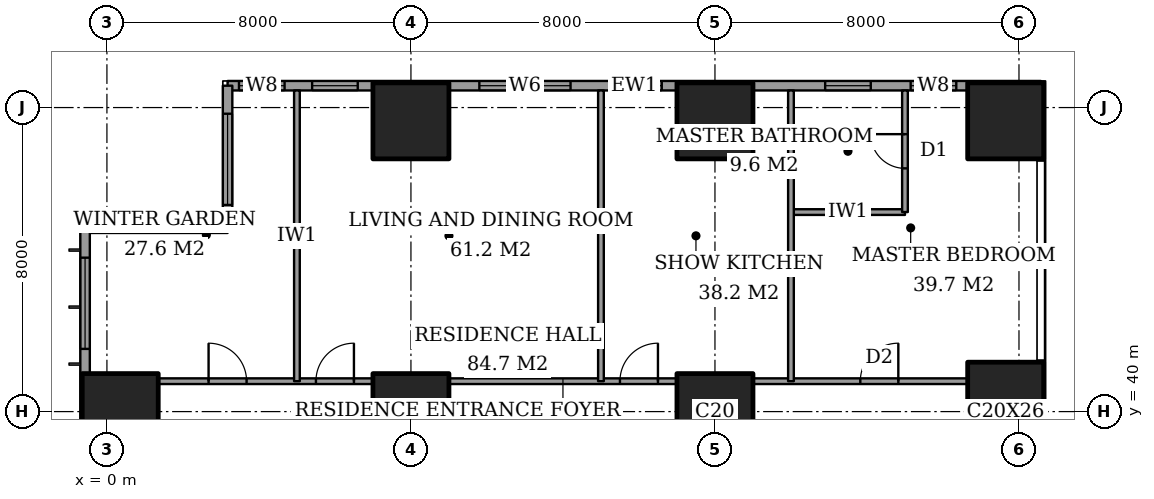
"""IFC4 building model, lengths in metres.
Left out: names, types, materials, properties, quantities, classifications, styles, units other than length and angle.
Written with IfcOpenShell. Run it as: python <this file> out.ifc"""

import sys

from ifc_helpers import new_model, si_unit, direction, frame, frame_2d, origin, origin_2d, place, context, subcontext, project, spatial, rectangle, extrude, element, fill, save


model = new_model("IFC4")
c1 = context("Model", 3, precision=1e-05, world=origin(), true_north=direction((0.0, 1.0)))
c2 = subcontext(c1, "Body", "Model", "MODEL_VIEW")
j1 = project(units=[si_unit("LENGTHUNIT", "METRE"), si_unit("PLANEANGLEUNIT", "RADIAN")], contexts=[c1])
p1 = place(None, origin())
s1 = spatial("IfcSite", under=j1, at=p1, CompositionType="ELEMENT")
p2 = place(p1, origin())
s2 = spatial("IfcBuilding", under=s1, at=p2, CompositionType="ELEMENT")
p3 = place(p2, frame((0.0, 0.0, 54.8)))
s3 = spatial("IfcBuildingStorey", under=s2, at=p3, CompositionType="ELEMENT", Elevation=54.8)
for number, where, z_axis, x_axis in (
    (1, (0.35, 40.0, 0.0), (0.0, 0.0, 1.0), (1.0, 0.0, 0.0)),
    (2, (8.0, 40.0, 0.0), (0.0, 0.0, 1.0), (1.0, 0.0, 0.0)),
    (3, (8.0, 47.65, 0.0), (0.0, 0.0, 1.0), (1.0, 0.0, 0.0)),
    (4, (16.0, 40.0, 0.0), (0.0, 0.0, 1.0), (1.0, 0.0, 0.0)),
    (5, (16.0, 47.65, 0.0), (0.0, 0.0, 1.0), (1.0, 0.0, 0.0)),
):
    element("IfcColumn", number, at=place(p3, frame(where, z_axis=z_axis, x_axis=x_axis)), inside=s3, PredefinedType="COLUMN", context=c2, shape_type="SweptSolid", body=[
        extrude(rectangle(XDim=2.0, YDim=2.0, at=origin_2d()), origin(), (0.0, 0.0, 1.0), 3.6),
    ])
p4 = place(p3, frame((23.65, 40.0, 0.0), z_axis=(0.0, 0.0, 1.0), x_axis=(1.0, 0.0, 0.0)))
e6 = element("IfcColumn", 6, at=p4, inside=s3, PredefinedType="COLUMN", context=c2, shape_type="SweptSolid", body=[
    extrude(rectangle(XDim=2.0, YDim=2.6, at=origin_2d()), origin(), (0.0, 0.0, 1.0), 3.6),
])
p5 = place(p3, frame((23.65, 47.65, 0.0), z_axis=(0.0, 0.0, 1.0), x_axis=(1.0, 0.0, 0.0)))
e7 = element("IfcColumn", 7, at=p5, inside=s3, PredefinedType="COLUMN", context=c2, shape_type="SweptSolid", body=[
    extrude(rectangle(XDim=2.0, YDim=2.0, at=origin_2d()), origin(), (0.0, 0.0, 1.0), 3.6),
])
p6 = place(p3, frame((24.575, 48.575, 0.0), z_axis=(0.0, 0.0, 1.0), x_axis=(-1.0, 0.0, 0.0)))
e8 = element("IfcWall", 8, at=p6, inside=s3, PredefinedType="SOLIDWALL", context=c2, shape_type="SweptSolid", body=[
    extrude(rectangle(XDim=21.4, YDim=0.25, at=frame_2d((10.7, 0.0))), origin(), (0.0, 0.0, 1.0), 3.6),
])
p7 = place(p6, frame((2.225, 0.0, 0.6)))
e9 = element("IfcOpeningElement", 9, at=p7, cuts=e8, PredefinedType="OPENING", context=c2, shape_type="SweptSolid", body=[
    extrude(rectangle(XDim=1.2, YDim=2.0, at=frame_2d((0.6, 1.0))), frame((0.0, 0.135, 0.0), z_axis=(0.0, -1.0, 0.0), x_axis=(1.0, 0.0, 0.0)), (0.0, 0.0, 1.0), 0.27),
])
p8 = place(p6, frame((4.475, 0.0, 0.6)))
e10 = element("IfcOpeningElement", 10, at=p8, cuts=e8, PredefinedType="OPENING", context=c2, shape_type="SweptSolid", body=[
    extrude(rectangle(XDim=1.2, YDim=2.0, at=frame_2d((0.6, 1.0))), frame((0.0, 0.135, 0.0), z_axis=(0.0, -1.0, 0.0), x_axis=(1.0, 0.0, 0.0)), (0.0, 0.0, 1.0), 0.27),
])
p9 = place(p6, frame((9.975, 0.0, 0.6)))
e11 = element("IfcOpeningElement", 11, at=p9, cuts=e8, PredefinedType="OPENING", context=c2, shape_type="SweptSolid", body=[
    extrude(rectangle(XDim=1.2, YDim=2.0, at=frame_2d((0.6, 1.0))), frame((0.0, 0.135, 0.0), z_axis=(0.0, -1.0, 0.0), x_axis=(1.0, 0.0, 0.0)), (0.0, 0.0, 1.0), 0.27),
])
p10 = place(p6, frame((12.375, 0.0, 0.6)))
e12 = element("IfcOpeningElement", 12, at=p10, cuts=e8, PredefinedType="OPENING", context=c2, shape_type="SweptSolid", body=[
    extrude(rectangle(XDim=2.4, YDim=2.0, at=frame_2d((1.2, 1.0))), frame((0.0, 0.135, 0.0), z_axis=(0.0, -1.0, 0.0), x_axis=(1.0, 0.0, 0.0)), (0.0, 0.0, 1.0), 0.27),
])
p11 = place(p6, frame((17.975, 0.0, 0.6)))
e13 = element("IfcOpeningElement", 13, at=p11, cuts=e8, PredefinedType="OPENING", context=c2, shape_type="SweptSolid", body=[
    extrude(rectangle(XDim=1.2, YDim=2.0, at=frame_2d((0.6, 1.0))), frame((0.0, 0.135, 0.0), z_axis=(0.0, -1.0, 0.0), x_axis=(1.0, 0.0, 0.0)), (0.0, 0.0, 1.0), 0.27),
])
p12 = place(p6, frame((19.9, 0.0, 0.6)))
e14 = element("IfcOpeningElement", 14, at=p12, cuts=e8, PredefinedType="OPENING", context=c2, shape_type="SweptSolid", body=[
    extrude(rectangle(XDim=1.2, YDim=2.0, at=frame_2d((0.6, 1.0))), frame((0.0, 0.135, 0.0), z_axis=(0.0, -1.0, 0.0), x_axis=(1.0, 0.0, 0.0)), (0.0, 0.0, 1.0), 0.27),
])
p13 = place(p3, frame((3.175, 48.575, 0.0), z_axis=(0.0, 0.0, 1.0), x_axis=(0.0, -1.0, 0.0)))
e15 = element("IfcWall", 15, at=p13, inside=s3, PredefinedType="SOLIDWALL", context=c2, shape_type="SweptSolid", body=[
    extrude(rectangle(XDim=3.75, YDim=0.25, at=frame_2d((1.875, 0.0))), origin(), (0.0, 0.0, 1.0), 3.6),
])
p14 = place(p13, frame((0.738, 0.0, 0.6)))
e16 = element("IfcOpeningElement", 16, at=p14, cuts=e15, PredefinedType="OPENING", context=c2, shape_type="SweptSolid", body=[
    extrude(rectangle(XDim=2.4, YDim=2.0, at=frame_2d((1.2, 1.0))), frame((0.0, 0.135, 0.0), z_axis=(0.0, -1.0, 0.0), x_axis=(1.0, 0.0, 0.0)), (0.0, 0.0, 1.0), 0.27),
])
p15 = place(p3, frame((3.175, 44.825, 0.0), z_axis=(0.0, 0.0, 1.0), x_axis=(-1.0, 0.0, 0.0)))
e17 = element("IfcWall", 17, at=p15, inside=s3, PredefinedType="SOLIDWALL", context=c2, shape_type="SweptSolid", body=[
    extrude(rectangle(XDim=3.75, YDim=0.25, at=frame_2d((1.875, 0.0))), origin(), (0.0, 0.0, 1.0), 3.6),
])
p16 = place(p15, frame((0.613, 0.0, 0.6)))
e18 = element("IfcOpeningElement", 18, at=p16, cuts=e17, PredefinedType="OPENING", context=c2, shape_type="SweptSolid", body=[
    extrude(rectangle(XDim=2.4, YDim=2.0, at=frame_2d((1.2, 1.0))), frame((0.0, 0.135, 0.0), z_axis=(0.0, -1.0, 0.0), x_axis=(1.0, 0.0, 0.0)), (0.0, 0.0, 1.0), 0.27),
])
p17 = place(p3, frame((-0.575, 44.825, 0.0), z_axis=(0.0, 0.0, 1.0), x_axis=(0.0, -1.0, 0.0)))
e19 = element("IfcWall", 19, at=p17, inside=s3, PredefinedType="SOLIDWALL", context=c2, shape_type="SweptSolid", body=[
    extrude(rectangle(XDim=41.65, YDim=0.25, at=frame_2d((20.825, 0.0))), origin(), (0.0, 0.0, 1.0), 3.6),
])
p18 = place(p17, frame((0.775, 0.0, 0.6)))
e20 = element("IfcOpeningElement", 20, at=p18, cuts=e19, PredefinedType="OPENING", context=c2, shape_type="SweptSolid", body=[
    extrude(rectangle(XDim=2.4, YDim=2.0, at=frame_2d((1.2, 1.0))), frame((0.0, 0.135, 0.0), z_axis=(0.0, -1.0, 0.0), x_axis=(1.0, 0.0, 0.0)), (0.0, 0.0, 1.0), 0.27),
])
p19 = place(p17, frame((6.1, 0.0, 0.6)))
e21 = element("IfcOpeningElement", 21, at=p19, cuts=e19, PredefinedType="OPENING", context=c2, shape_type="SweptSolid", body=[
    extrude(rectangle(XDim=1.2, YDim=2.0, at=frame_2d((0.6, 1.0))), frame((0.0, 0.135, 0.0), z_axis=(0.0, -1.0, 0.0), x_axis=(1.0, 0.0, 0.0)), (0.0, 0.0, 1.0), 0.27),
])
p20 = place(p17, frame((8.425, 0.0, 0.6)))
e22 = element("IfcOpeningElement", 22, at=p20, cuts=e19, PredefinedType="OPENING", context=c2, shape_type="SweptSolid", body=[
    extrude(rectangle(XDim=2.4, YDim=2.0, at=frame_2d((1.2, 1.0))), frame((0.0, 0.135, 0.0), z_axis=(0.0, -1.0, 0.0), x_axis=(1.0, 0.0, 0.0)), (0.0, 0.0, 1.0), 0.27),
])
p21 = place(p17, frame((15.625, 0.0, 0.6)))
e23 = element("IfcOpeningElement", 23, at=p21, cuts=e19, PredefinedType="OPENING", context=c2, shape_type="SweptSolid", body=[
    extrude(rectangle(XDim=2.4, YDim=2.0, at=frame_2d((1.2, 1.0))), frame((0.0, 0.135, 0.0), z_axis=(0.0, -1.0, 0.0), x_axis=(1.0, 0.0, 0.0)), (0.0, 0.0, 1.0), 0.27),
])
p22 = place(p17, frame((23.625, 0.0, 0.6)))
e24 = element("IfcOpeningElement", 24, at=p22, cuts=e19, PredefinedType="OPENING", context=c2, shape_type="SweptSolid", body=[
    extrude(rectangle(XDim=2.4, YDim=2.0, at=frame_2d((1.2, 1.0))), frame((0.0, 0.135, 0.0), z_axis=(0.0, -1.0, 0.0), x_axis=(1.0, 0.0, 0.0)), (0.0, 0.0, 1.0), 0.27),
])
p23 = place(p17, frame((30.825, 0.0, 0.6)))
e25 = element("IfcOpeningElement", 25, at=p23, cuts=e19, PredefinedType="OPENING", context=c2, shape_type="SweptSolid", body=[
    extrude(rectangle(XDim=2.4, YDim=2.0, at=frame_2d((1.2, 1.0))), frame((0.0, 0.135, 0.0), z_axis=(0.0, -1.0, 0.0), x_axis=(1.0, 0.0, 0.0)), (0.0, 0.0, 1.0), 0.27),
])
p24 = place(p17, frame((34.5, 0.0, 0.6)))
e26 = element("IfcOpeningElement", 26, at=p24, cuts=e19, PredefinedType="OPENING", context=c2, shape_type="SweptSolid", body=[
    extrude(rectangle(XDim=1.2, YDim=2.0, at=frame_2d((0.6, 1.0))), frame((0.0, 0.135, 0.0), z_axis=(0.0, -1.0, 0.0), x_axis=(1.0, 0.0, 0.0)), (0.0, 0.0, 1.0), 0.27),
])
p25 = place(p17, frame((38.475, 0.0, 0.6)))
e27 = element("IfcOpeningElement", 27, at=p25, cuts=e19, PredefinedType="OPENING", context=c2, shape_type="SweptSolid", body=[
    extrude(rectangle(XDim=2.4, YDim=2.0, at=frame_2d((1.2, 1.0))), frame((0.0, 0.135, 0.0), z_axis=(0.0, -1.0, 0.0), x_axis=(1.0, 0.0, 0.0)), (0.0, 0.0, 1.0), 0.27),
])
p26 = place(p3, frame((1.35, 40.8, 0.0), z_axis=(0.0, 0.0, 1.0), x_axis=(1.0, 0.0, 0.0)))
e28 = element("IfcWall", 28, at=p26, inside=s3, PredefinedType="PARTITIONING", context=c2, shape_type="SweptSolid", body=[
    extrude(rectangle(XDim=5.65, YDim=0.15, at=frame_2d((2.825, 0.0))), origin(), (0.0, 0.0, 1.0), 3.35),
])
p27 = place(p26, frame((1.325, 0.0, 0.0)))
e29 = element("IfcOpeningElement", 29, at=p27, cuts=e28, PredefinedType="OPENING", context=c2, shape_type="SweptSolid", body=[
    extrude(rectangle(XDim=1.0, YDim=2.1, at=frame_2d((0.5, 1.05))), frame((0.0, 0.085, 0.0), z_axis=(0.0, -1.0, 0.0), x_axis=(1.0, 0.0, 0.0)), (0.0, 0.0, 1.0), 0.17),
])
p28 = place(p26, frame((4.15, 0.0, 0.0)))
e30 = element("IfcOpeningElement", 30, at=p28, cuts=e28, PredefinedType="OPENING", context=c2, shape_type="SweptSolid", body=[
    extrude(rectangle(XDim=1.0, YDim=2.1, at=frame_2d((0.5, 1.05))), frame((0.0, 0.085, 0.0), z_axis=(0.0, -1.0, 0.0), x_axis=(1.0, 0.0, 0.0)), (0.0, 0.0, 1.0), 0.17),
])
p29 = place(p3, frame((9.0, 40.8, 0.0), z_axis=(0.0, 0.0, 1.0), x_axis=(1.0, 0.0, 0.0)))
e31 = element("IfcWall", 31, at=p29, inside=s3, PredefinedType="PARTITIONING", context=c2, shape_type="SweptSolid", body=[
    extrude(rectangle(XDim=6.0, YDim=0.15, at=frame_2d((3.0, 0.0))), origin(), (0.0, 0.0, 1.0), 3.35),
])
p30 = place(p29, frame((4.5, 0.0, 0.0)))
e32 = element("IfcOpeningElement", 32, at=p30, cuts=e31, PredefinedType="OPENING", context=c2, shape_type="SweptSolid", body=[
    extrude(rectangle(XDim=1.0, YDim=2.1, at=frame_2d((0.5, 1.05))), frame((0.0, 0.085, 0.0), z_axis=(0.0, -1.0, 0.0), x_axis=(1.0, 0.0, 0.0)), (0.0, 0.0, 1.0), 0.17),
])
p31 = place(p3, frame((17.0, 40.8, 0.0), z_axis=(0.0, 0.0, 1.0), x_axis=(1.0, 0.0, 0.0)))
e33 = element("IfcWall", 33, at=p31, inside=s3, PredefinedType="PARTITIONING", context=c2, shape_type="SweptSolid", body=[
    extrude(rectangle(XDim=5.65, YDim=0.15, at=frame_2d((2.825, 0.0))), origin(), (0.0, 0.0, 1.0), 3.35),
])
p32 = place(p31, frame((2.825, 0.0, 0.0)))
e34 = element("IfcOpeningElement", 34, at=p32, cuts=e33, PredefinedType="OPENING", context=c2, shape_type="SweptSolid", body=[
    extrude(rectangle(XDim=1.0, YDim=2.1, at=frame_2d((0.5, 1.05))), frame((0.0, 0.085, 0.0), z_axis=(0.0, -1.0, 0.0), x_axis=(1.0, 0.0, 0.0)), (0.0, 0.0, 1.0), 0.17),
])
p33 = place(p3, frame((18.0, 45.25, 0.0), z_axis=(0.0, 0.0, 1.0), x_axis=(1.0, 0.0, 0.0)))
e35 = element("IfcWall", 35, at=p33, inside=s3, PredefinedType="PARTITIONING", context=c2, shape_type="SweptSolid", body=[
    extrude(rectangle(XDim=3.0, YDim=0.15, at=frame_2d((1.5, 0.0))), origin(), (0.0, 0.0, 1.0), 3.35),
])
for number, where, z_axis, x_axis in (
    (36, (5.0, 40.8, 0.0), (0.0, 0.0, 1.0), (0.0, 1.0, 0.0)),
    (37, (13.0, 40.8, 0.0), (0.0, 0.0, 1.0), (0.0, 1.0, 0.0)),
    (38, (18.0, 40.8, 0.0), (0.0, 0.0, 1.0), (0.0, 1.0, 0.0)),
):
    element("IfcWall", number, at=place(p3, frame(where, z_axis=z_axis, x_axis=x_axis)), inside=s3, PredefinedType="PARTITIONING", context=c2, shape_type="SweptSolid", body=[
        extrude(rectangle(XDim=7.65, YDim=0.15, at=frame_2d((3.825, 0.0))), origin(), (0.0, 0.0, 1.0), 3.35),
    ])
p34 = place(p3, frame((21.0, 45.25, 0.0), z_axis=(0.0, 0.0, 1.0), x_axis=(0.0, 1.0, 0.0)))
e39 = element("IfcWall", 39, at=p34, inside=s3, PredefinedType="PARTITIONING", context=c2, shape_type="SweptSolid", body=[
    extrude(rectangle(XDim=3.2, YDim=0.15, at=frame_2d((1.6, 0.0))), origin(), (0.0, 0.0, 1.0), 3.35),
])
p35 = place(p34, frame((1.15, 0.0, 0.0)))
e40 = element("IfcOpeningElement", 40, at=p35, cuts=e39, PredefinedType="OPENING", context=c2, shape_type="SweptSolid", body=[
    extrude(rectangle(XDim=0.9, YDim=2.1, at=frame_2d((0.45, 1.05))), frame((0.0, 0.085, 0.0), z_axis=(0.0, -1.0, 0.0), x_axis=(1.0, 0.0, 0.0)), (0.0, 0.0, 1.0), 0.17),
])
p36 = place(p7, origin())
e41 = element("IfcWindow", 41, at=p36, inside=s3, PartitioningType="SINGLE_PANEL", PredefinedType="WINDOW", context=c2, shape_type="SweptSolid", body=[
    extrude(rectangle(XDim=1.2, YDim=2.0, at=frame_2d((0.6, 1.0))), frame((0.0, 0.03, 0.0), z_axis=(0.0, -1.0, 0.0), x_axis=(1.0, 0.0, 0.0)), (0.0, 0.0, 1.0), 0.06),
])
fill(e9, e41)
p37 = place(p8, origin())
e42 = element("IfcWindow", 42, at=p37, inside=s3, PartitioningType="SINGLE_PANEL", PredefinedType="WINDOW", context=c2, shape_type="SweptSolid", body=[
    extrude(rectangle(XDim=1.2, YDim=2.0, at=frame_2d((0.6, 1.0))), frame((0.0, 0.03, 0.0), z_axis=(0.0, -1.0, 0.0), x_axis=(1.0, 0.0, 0.0)), (0.0, 0.0, 1.0), 0.06),
])
fill(e10, e42)
p38 = place(p9, origin())
e43 = element("IfcWindow", 43, at=p38, inside=s3, PartitioningType="SINGLE_PANEL", PredefinedType="WINDOW", context=c2, shape_type="SweptSolid", body=[
    extrude(rectangle(XDim=1.2, YDim=2.0, at=frame_2d((0.6, 1.0))), frame((0.0, 0.03, 0.0), z_axis=(0.0, -1.0, 0.0), x_axis=(1.0, 0.0, 0.0)), (0.0, 0.0, 1.0), 0.06),
])
fill(e11, e43)
p39 = place(p10, origin())
e44 = element("IfcWindow", 44, at=p39, inside=s3, PartitioningType="SINGLE_PANEL", PredefinedType="WINDOW", context=c2, shape_type="SweptSolid", body=[
    extrude(rectangle(XDim=2.4, YDim=2.0, at=frame_2d((1.2, 1.0))), frame((0.0, 0.03, 0.0), z_axis=(0.0, -1.0, 0.0), x_axis=(1.0, 0.0, 0.0)), (0.0, 0.0, 1.0), 0.06),
])
fill(e12, e44)
p40 = place(p11, origin())
e45 = element("IfcWindow", 45, at=p40, inside=s3, PartitioningType="SINGLE_PANEL", PredefinedType="WINDOW", context=c2, shape_type="SweptSolid", body=[
    extrude(rectangle(XDim=1.2, YDim=2.0, at=frame_2d((0.6, 1.0))), frame((0.0, 0.03, 0.0), z_axis=(0.0, -1.0, 0.0), x_axis=(1.0, 0.0, 0.0)), (0.0, 0.0, 1.0), 0.06),
])
fill(e13, e45)
p41 = place(p12, origin())
e46 = element("IfcWindow", 46, at=p41, inside=s3, PartitioningType="SINGLE_PANEL", PredefinedType="WINDOW", context=c2, shape_type="SweptSolid", body=[
    extrude(rectangle(XDim=1.2, YDim=2.0, at=frame_2d((0.6, 1.0))), frame((0.0, 0.03, 0.0), z_axis=(0.0, -1.0, 0.0), x_axis=(1.0, 0.0, 0.0)), (0.0, 0.0, 1.0), 0.06),
])
fill(e14, e46)
p42 = place(p14, origin())
e47 = element("IfcWindow", 47, at=p42, inside=s3, PartitioningType="SINGLE_PANEL", PredefinedType="WINDOW", context=c2, shape_type="SweptSolid", body=[
    extrude(rectangle(XDim=2.4, YDim=2.0, at=frame_2d((1.2, 1.0))), frame((0.0, 0.03, 0.0), z_axis=(0.0, -1.0, 0.0), x_axis=(1.0, 0.0, 0.0)), (0.0, 0.0, 1.0), 0.06),
])
fill(e16, e47)
p43 = place(p16, origin())
e48 = element("IfcWindow", 48, at=p43, inside=s3, PartitioningType="SINGLE_PANEL", PredefinedType="WINDOW", context=c2, shape_type="SweptSolid", body=[
    extrude(rectangle(XDim=2.4, YDim=2.0, at=frame_2d((1.2, 1.0))), frame((0.0, 0.03, 0.0), z_axis=(0.0, -1.0, 0.0), x_axis=(1.0, 0.0, 0.0)), (0.0, 0.0, 1.0), 0.06),
])
fill(e18, e48)
p44 = place(p18, origin())
e49 = element("IfcWindow", 49, at=p44, inside=s3, PartitioningType="SINGLE_PANEL", PredefinedType="WINDOW", context=c2, shape_type="SweptSolid", body=[
    extrude(rectangle(XDim=2.4, YDim=2.0, at=frame_2d((1.2, 1.0))), frame((0.0, 0.03, 0.0), z_axis=(0.0, -1.0, 0.0), x_axis=(1.0, 0.0, 0.0)), (0.0, 0.0, 1.0), 0.06),
])
fill(e20, e49)
p45 = place(p27, origin())
e50 = element("IfcDoor", 50, at=p45, inside=s3, OperationType="SINGLE_SWING_RIGHT", PredefinedType="DOOR", context=c2, shape_type="SweptSolid", body=[
    extrude(rectangle(XDim=1.0, YDim=2.1, at=frame_2d((0.5, 1.05))), frame((0.0, 0.025, 0.0), z_axis=(0.0, -1.0, 0.0), x_axis=(1.0, 0.0, 0.0)), (0.0, 0.0, 1.0), 0.05),
])
fill(e29, e50)
p46 = place(p28, origin())
e51 = element("IfcDoor", 51, at=p46, inside=s3, OperationType="SINGLE_SWING_LEFT", PredefinedType="DOOR", context=c2, shape_type="SweptSolid", body=[
    extrude(rectangle(XDim=1.0, YDim=2.1, at=frame_2d((0.5, 1.05))), frame((0.0, 0.025, 0.0), z_axis=(0.0, -1.0, 0.0), x_axis=(1.0, 0.0, 0.0)), (0.0, 0.0, 1.0), 0.05),
])
fill(e30, e51)
p47 = place(p30, origin())
e52 = element("IfcDoor", 52, at=p47, inside=s3, OperationType="SINGLE_SWING_LEFT", PredefinedType="DOOR", context=c2, shape_type="SweptSolid", body=[
    extrude(rectangle(XDim=1.0, YDim=2.1, at=frame_2d((0.5, 1.05))), frame((0.0, 0.025, 0.0), z_axis=(0.0, -1.0, 0.0), x_axis=(1.0, 0.0, 0.0)), (0.0, 0.0, 1.0), 0.05),
])
fill(e32, e52)
p48 = place(p35, origin())
e53 = element("IfcDoor", 53, at=p48, inside=s3, OperationType="SINGLE_SWING_LEFT", PredefinedType="DOOR", context=c2, shape_type="SweptSolid", body=[
    extrude(rectangle(XDim=0.9, YDim=2.1, at=frame_2d((0.45, 1.05))), frame((0.0, 0.025, 0.0), z_axis=(0.0, -1.0, 0.0), x_axis=(1.0, 0.0, 0.0)), (0.0, 0.0, 1.0), 0.05),
])
fill(e40, e53)
p49 = place(p32, origin())
e54 = element("IfcDoor", 54, at=p49, inside=s3, OperationType="SINGLE_SWING_LEFT", PredefinedType="DOOR", context=c2, shape_type="SweptSolid", body=[
    extrude(rectangle(XDim=1.0, YDim=2.1, at=frame_2d((0.5, 1.05))), frame((0.0, 0.025, 0.0), z_axis=(0.0, -1.0, 0.0), x_axis=(1.0, 0.0, 0.0)), (0.0, 0.0, 1.0), 0.05),
])
fill(e34, e54)
save(model, sys.argv[1])
